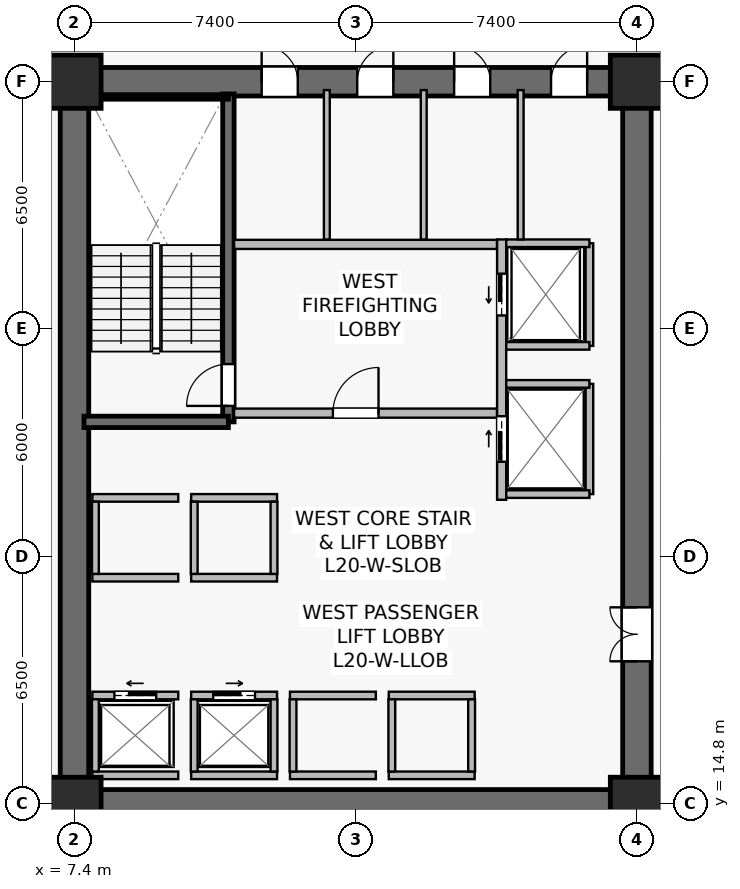
"""IFC4 building model, lengths in metres.
Left out: names, types, materials, properties, quantities, classifications, styles, units other than length and angle.
Written with IfcOpenShell. Run it as: python <this file> out.ifc"""

import sys

from ifc_helpers import new_model, si_unit, direction, frame, frame_2d, origin, origin_2d, place, context, subcontext, project, spatial, rectangle, extrude, source, transform, mapped, element, fill, save


model = new_model("IFC4")
c1 = context("Model", 3, precision=1e-05, world=origin(), true_north=direction((0.0, 1.0)))
c2 = subcontext(c1, "Body", "Model", "MODEL_VIEW")
j1 = project(units=[si_unit("LENGTHUNIT", "METRE"), si_unit("PLANEANGLEUNIT", "RADIAN")], contexts=[c1])
p1 = place(None, origin())
s1 = spatial("IfcSite", under=j1, at=p1, CompositionType="ELEMENT")
p2 = place(p1, origin())
s2 = spatial("IfcBuilding", under=s1, at=p2, CompositionType="ELEMENT")
p3 = place(p2, frame((0.0, 0.0, 82.6)))
s3 = spatial("IfcBuildingStorey", under=s2, at=p3, CompositionType="ELEMENT", Elevation=82.6)
p4 = place(p3, frame((7.025, 14.8, 0.0), z_axis=(0.0, 0.0, 1.0), x_axis=(1.0, 0.0, 0.0)))
e1 = element("IfcWall", 1, at=p4, inside=s3, PredefinedType="SHEAR", context=c2, shape_type="SweptSolid", body=[
    extrude(rectangle(XDim=15.55, YDim=0.75, at=frame_2d((7.775, 0.0))), origin(), (0.0, 0.0, 1.0), 3.78),
])
p5 = place(p3, frame((7.025, 33.8, 0.0), z_axis=(0.0, 0.0, 1.0), x_axis=(1.0, 0.0, 0.0)))
e2 = element("IfcWall", 2, at=p5, inside=s3, PredefinedType="SHEAR", context=c2, shape_type="SweptSolid", body=[
    extrude(rectangle(XDim=15.55, YDim=0.75, at=frame_2d((7.775, 0.0))), origin(), (0.0, 0.0, 1.0), 3.78),
])
p6 = place(p5, frame((5.3, 0.0, 0.0)))
e3 = element("IfcOpeningElement", 3, at=p6, cuts=e2, PredefinedType="OPENING", context=c2, shape_type="SweptSolid", body=[
    extrude(rectangle(XDim=0.95, YDim=2.15, at=frame_2d((0.475, 1.075))), frame((0.0, 0.385, 0.0), z_axis=(0.0, -1.0, 0.0), x_axis=(1.0, 0.0, 0.0)), (0.0, 0.0, 1.0), 0.77),
])
p7 = place(p5, frame((7.815, 0.0, 0.0)))
e4 = element("IfcOpeningElement", 4, at=p7, cuts=e2, PredefinedType="OPENING", context=c2, shape_type="SweptSolid", body=[
    extrude(rectangle(XDim=0.95, YDim=2.15, at=frame_2d((0.475, 1.075))), frame((0.0, 0.385, 0.0), z_axis=(0.0, -1.0, 0.0), x_axis=(1.0, 0.0, 0.0)), (0.0, 0.0, 1.0), 0.77),
])
p8 = place(p5, frame((10.365, 0.0, 0.0)))
e5 = element("IfcOpeningElement", 5, at=p8, cuts=e2, PredefinedType="OPENING", context=c2, shape_type="SweptSolid", body=[
    extrude(rectangle(XDim=0.95, YDim=2.15, at=frame_2d((0.475, 1.075))), frame((0.0, 0.385, 0.0), z_axis=(0.0, -1.0, 0.0), x_axis=(1.0, 0.0, 0.0)), (0.0, 0.0, 1.0), 0.77),
])
p9 = place(p5, frame((12.915, 0.0, 0.0)))
e6 = element("IfcOpeningElement", 6, at=p9, cuts=e2, PredefinedType="OPENING", context=c2, shape_type="SweptSolid", body=[
    extrude(rectangle(XDim=0.95, YDim=2.15, at=frame_2d((0.475, 1.075))), frame((0.0, 0.385, 0.0), z_axis=(0.0, -1.0, 0.0), x_axis=(1.0, 0.0, 0.0)), (0.0, 0.0, 1.0), 0.77),
])
p10 = place(p3, frame((7.4, 15.175, 0.0), z_axis=(0.0, 0.0, 1.0), x_axis=(0.0, 1.0, 0.0)))
e7 = element("IfcWall", 7, at=p10, inside=s3, PredefinedType="SHEAR", context=c2, shape_type="SweptSolid", body=[
    extrude(rectangle(XDim=18.25, YDim=0.75, at=frame_2d((9.125, 0.0))), origin(), (0.0, 0.0, 1.0), 3.78),
])
p11 = place(p3, frame((22.2, 15.175, 0.0), z_axis=(0.0, 0.0, 1.0), x_axis=(0.0, 1.0, 0.0)))
e8 = element("IfcWall", 8, at=p11, inside=s3, PredefinedType="SHEAR", context=c2, shape_type="SweptSolid", body=[
    extrude(rectangle(XDim=18.25, YDim=0.75, at=frame_2d((9.125, 0.0))), origin(), (0.0, 0.0, 1.0), 3.78),
])
p12 = place(p11, frame((3.375, 0.0, 0.0)))
e9 = element("IfcOpeningElement", 9, at=p12, cuts=e8, PredefinedType="OPENING", context=c2, shape_type="SweptSolid", body=[
    extrude(rectangle(XDim=1.42, YDim=2.2, at=frame_2d((0.71, 1.1))), frame((0.0, 0.385, 0.0), z_axis=(0.0, -1.0, 0.0), x_axis=(1.0, 0.0, 0.0)), (0.0, 0.0, 1.0), 0.77),
])
p13 = place(p3, frame((11.45, 24.85, 0.0), z_axis=(0.0, 0.0, 1.0), x_axis=(0.0, 1.0, 0.0)))
e10 = element("IfcWall", 10, at=p13, inside=s3, PredefinedType="SHEAR", context=c2, shape_type="SweptSolid", body=[
    extrude(rectangle(XDim=8.63, YDim=0.3, at=frame_2d((4.315, 0.0))), origin(), (0.0, 0.0, 1.0), 3.78),
])
p14 = place(p13, frame((0.42, 0.0, 0.0)))
e11 = element("IfcOpeningElement", 11, at=p14, cuts=e10, PredefinedType="OPENING", context=c2, shape_type="SweptSolid", body=[
    extrude(rectangle(XDim=1.1, YDim=2.15, at=frame_2d((0.55, 1.075))), frame((0.0, 0.16, 0.0), z_axis=(0.0, -1.0, 0.0), x_axis=(1.0, 0.0, 0.0)), (0.0, 0.0, 1.0), 0.32),
])
p15 = place(p3, frame((7.65, 24.85, 0.0), z_axis=(0.0, 0.0, 1.0), x_axis=(1.0, 0.0, 0.0)))
e12 = element("IfcWall", 12, at=p15, inside=s3, PredefinedType="SHEAR", context=c2, shape_type="SweptSolid", body=[
    extrude(rectangle(XDim=3.8, YDim=0.3, at=frame_2d((1.9, 0.0))), origin(), (0.0, 0.0, 1.0), 3.78),
])
p16 = place(p3, frame((7.73, 33.4, 0.0), z_axis=(0.0, 0.0, 1.0), x_axis=(1.0, 0.0, 0.0)))
e13 = element("IfcWall", 13, at=p16, inside=s3, PredefinedType="SOLIDWALL", context=c2, shape_type="SweptSolid", body=[
    extrude(rectangle(XDim=3.72, YDim=0.12, at=frame_2d((1.86, 0.0))), origin(), (0.0, 0.0, 1.0), 3.78),
])
m1 = source(origin(), c2, "Body", "SweptSolid", [
    extrude(rectangle(XDim=1.4, YDim=1.4, at=origin_2d()), origin(), (0.0, 0.0, 1.0), 4.1),
])
for number, where, z_axis, x_axis in (
    (14, (7.4, 14.8, 0.0), (0.0, 0.0, 1.0), (1.0, 0.0, 0.0)),
    (15, (22.2, 14.8, 0.0), (0.0, 0.0, 1.0), (1.0, 0.0, 0.0)),
    (16, (7.4, 33.8, 0.0), (0.0, 0.0, 1.0), (1.0, 0.0, 0.0)),
    (17, (22.2, 33.8, 0.0), (0.0, 0.0, 1.0), (1.0, 0.0, 0.0)),
):
    element("IfcColumn", number, at=place(p3, frame(where, z_axis=z_axis, x_axis=x_axis)), inside=s3, PredefinedType="COLUMN", context=c2, shape_type="MappedRepresentation", body=[
        mapped(m1, transform((0.0, 0.0, 0.0), scale=1.0)),
    ])
p17 = place(p3, frame((11.6, 25.08, 0.0), z_axis=(0.0, 0.0, 1.0), x_axis=(1.0, 0.0, 0.0)))
e18 = element("IfcWall", 18, at=p17, inside=s3, PredefinedType="SOLIDWALL", context=c2, shape_type="SweptSolid", body=[
    extrude(rectangle(XDim=6.92, YDim=0.24, at=frame_2d((3.46, 0.0))), origin(), (0.0, 0.0, 1.0), 3.115),
])
p18 = place(p17, frame((2.6, 0.0, 0.0)))
e19 = element("IfcOpeningElement", 19, at=p18, cuts=e18, PredefinedType="OPENING", context=c2, shape_type="SweptSolid", body=[
    extrude(rectangle(XDim=1.2, YDim=2.16, at=frame_2d((0.6, 1.08))), frame((0.0, 0.13, 0.0), z_axis=(0.0, -1.0, 0.0), x_axis=(1.0, 0.0, 0.0)), (0.0, 0.0, 1.0), 0.26),
])
p19 = place(p3, frame((11.6, 29.52, 0.0), z_axis=(0.0, 0.0, 1.0), x_axis=(1.0, 0.0, 0.0)))
e20 = element("IfcWall", 20, at=p19, inside=s3, PredefinedType="SOLIDWALL", context=c2, shape_type="SweptSolid", body=[
    extrude(rectangle(XDim=6.92, YDim=0.24, at=frame_2d((3.46, 0.0))), origin(), (0.0, 0.0, 1.0), 3.115),
])
p20 = place(p3, frame((18.64, 22.8, 0.0), z_axis=(0.0, 0.0, 1.0), x_axis=(0.0, 1.0, 0.0)))
e21 = element("IfcWall", 21, at=p20, inside=s3, PredefinedType="SOLIDWALL", context=c2, shape_type="SweptSolid", body=[
    extrude(rectangle(XDim=6.85, YDim=0.24, at=frame_2d((3.425, 0.0))), origin(), (0.0, 0.0, 1.0), 2.865),
])
p21 = place(p20, frame((4.85, 0.0, 0.0)))
e22 = element("IfcOpeningElement", 22, at=p21, cuts=e21, PredefinedType="OPENING", context=c2, shape_type="SweptSolid", body=[
    extrude(rectangle(XDim=1.1, YDim=2.22, at=frame_2d((0.55, 1.11))), frame((0.0, 0.13, 0.0), z_axis=(0.0, -1.0, 0.0), x_axis=(1.0, 0.0, 0.0)), (0.0, 0.0, 1.0), 0.26),
])
p22 = place(p20, frame((1.0, 0.0, 0.0)))
e23 = element("IfcOpeningElement", 23, at=p22, cuts=e21, PredefinedType="OPENING", context=c2, shape_type="SweptSolid", body=[
    extrude(rectangle(XDim=1.2, YDim=2.22, at=frame_2d((0.6, 1.11))), frame((0.0, 0.13, 0.0), z_axis=(0.0, -1.0, 0.0), x_axis=(1.0, 0.0, 0.0)), (0.0, 0.0, 1.0), 0.26),
])
p23 = place(p3, frame((7.87, 17.65, 0.0), z_axis=(0.0, 0.0, 1.0), x_axis=(1.0, 0.0, 0.0)))
e24 = element("IfcWall", 24, at=p23, inside=s3, PredefinedType="SOLIDWALL", context=c2, shape_type="SweptSolid", body=[
    extrude(rectangle(XDim=2.26, YDim=0.2, at=frame_2d((1.13, 0.0))), origin(), (0.0, 0.0, 1.0), 3.78),
])
p24 = place(p23, frame((0.58, 0.0, 0.0)))
e25 = element("IfcOpeningElement", 25, at=p24, cuts=e24, PredefinedType="OPENING", context=c2, shape_type="SweptSolid", body=[
    extrude(rectangle(XDim=1.1, YDim=2.22, at=frame_2d((0.55, 1.11))), frame((0.0, 0.11, 0.0), z_axis=(0.0, -1.0, 0.0), x_axis=(1.0, 0.0, 0.0)), (0.0, 0.0, 1.0), 0.22),
])
p25 = place(p3, frame((7.87, 15.55, 0.0), z_axis=(0.0, 0.0, 1.0), x_axis=(1.0, 0.0, 0.0)))
e26 = element("IfcWall", 26, at=p25, inside=s3, PredefinedType="SOLIDWALL", context=c2, shape_type="SweptSolid", body=[
    extrude(rectangle(XDim=2.26, YDim=0.2, at=frame_2d((1.13, 0.0))), origin(), (0.0, 0.0, 1.0), 3.78),
])
p26 = place(p3, frame((7.95, 15.65, 0.0), z_axis=(0.0, 0.0, 1.0), x_axis=(0.0, 1.0, 0.0)))
e27 = element("IfcWall", 27, at=p26, inside=s3, PredefinedType="SOLIDWALL", context=c2, shape_type="SweptSolid", body=[
    extrude(rectangle(XDim=1.9, YDim=0.18, at=frame_2d((0.95, 0.0))), origin(), (0.0, 0.0, 1.0), 3.78),
])
p27 = place(p3, frame((10.47, 17.65, 0.0), z_axis=(0.0, 0.0, 1.0), x_axis=(1.0, 0.0, 0.0)))
e28 = element("IfcWall", 28, at=p27, inside=s3, PredefinedType="SOLIDWALL", context=c2, shape_type="SweptSolid", body=[
    extrude(rectangle(XDim=2.26, YDim=0.2, at=frame_2d((1.13, 0.0))), origin(), (0.0, 0.0, 1.0), 3.78),
])
p28 = place(p27, frame((0.58, 0.0, 0.0)))
e29 = element("IfcOpeningElement", 29, at=p28, cuts=e28, PredefinedType="OPENING", context=c2, shape_type="SweptSolid", body=[
    extrude(rectangle(XDim=1.1, YDim=2.22, at=frame_2d((0.55, 1.11))), frame((0.0, 0.11, 0.0), z_axis=(0.0, -1.0, 0.0), x_axis=(1.0, 0.0, 0.0)), (0.0, 0.0, 1.0), 0.22),
])
p29 = place(p3, frame((10.47, 15.55, 0.0), z_axis=(0.0, 0.0, 1.0), x_axis=(1.0, 0.0, 0.0)))
e30 = element("IfcWall", 30, at=p29, inside=s3, PredefinedType="SOLIDWALL", context=c2, shape_type="SweptSolid", body=[
    extrude(rectangle(XDim=2.26, YDim=0.2, at=frame_2d((1.13, 0.0))), origin(), (0.0, 0.0, 1.0), 3.78),
])
for number, where, z_axis, x_axis in (
    (31, (10.55, 15.65, 0.0), (0.0, 0.0, 1.0), (0.0, 1.0, 0.0)),
    (32, (12.65, 15.65, 0.0), (0.0, 0.0, 1.0), (0.0, 1.0, 0.0)),
):
    element("IfcWall", number, at=place(p3, frame(where, z_axis=z_axis, x_axis=x_axis)), inside=s3, PredefinedType="SOLIDWALL", context=c2, shape_type="SweptSolid", body=[
        extrude(rectangle(XDim=1.9, YDim=0.18, at=frame_2d((0.95, 0.0))), origin(), (0.0, 0.0, 1.0), 3.78),
    ])
for number, where, z_axis, x_axis in (
    (33, (13.07, 17.65, 0.0), (0.0, 0.0, 1.0), (1.0, 0.0, 0.0)),
    (34, (13.07, 15.55, 0.0), (0.0, 0.0, 1.0), (1.0, 0.0, 0.0)),
):
    element("IfcWall", number, at=place(p3, frame(where, z_axis=z_axis, x_axis=x_axis)), inside=s3, PredefinedType="SOLIDWALL", context=c2, shape_type="SweptSolid", body=[
        extrude(rectangle(XDim=2.26, YDim=0.2, at=frame_2d((1.13, 0.0))), origin(), (0.0, 0.0, 1.0), 3.115),
    ])
p30 = place(p3, frame((13.15, 15.65, 0.0), z_axis=(0.0, 0.0, 1.0), x_axis=(0.0, 1.0, 0.0)))
e35 = element("IfcWall", 35, at=p30, inside=s3, PredefinedType="SOLIDWALL", context=c2, shape_type="SweptSolid", body=[
    extrude(rectangle(XDim=1.9, YDim=0.18, at=frame_2d((0.95, 0.0))), origin(), (0.0, 0.0, 1.0), 3.78),
])
for number, where, z_axis, x_axis in (
    (36, (15.67, 17.65, 0.0), (0.0, 0.0, 1.0), (1.0, 0.0, 0.0)),
    (37, (15.67, 15.55, 0.0), (0.0, 0.0, 1.0), (1.0, 0.0, 0.0)),
):
    element("IfcWall", number, at=place(p3, frame(where, z_axis=z_axis, x_axis=x_axis)), inside=s3, PredefinedType="SOLIDWALL", context=c2, shape_type="SweptSolid", body=[
        extrude(rectangle(XDim=2.26, YDim=0.2, at=frame_2d((1.13, 0.0))), origin(), (0.0, 0.0, 1.0), 3.78),
    ])
for number, where, z_axis, x_axis in (
    (38, (15.75, 15.65, 0.0), (0.0, 0.0, 1.0), (0.0, 1.0, 0.0)),
    (39, (17.85, 15.65, 0.0), (0.0, 0.0, 1.0), (0.0, 1.0, 0.0)),
):
    element("IfcWall", number, at=place(p3, frame(where, z_axis=z_axis, x_axis=x_axis)), inside=s3, PredefinedType="SOLIDWALL", context=c2, shape_type="SweptSolid", body=[
        extrude(rectangle(XDim=1.9, YDim=0.18, at=frame_2d((0.95, 0.0))), origin(), (0.0, 0.0, 1.0), 3.78),
    ])
for number, where, z_axis, x_axis in (
    (40, (7.87, 20.75, 0.0), (0.0, 0.0, 1.0), (1.0, 0.0, 0.0)),
    (41, (7.87, 22.85, 0.0), (0.0, 0.0, 1.0), (1.0, 0.0, 0.0)),
):
    element("IfcWall", number, at=place(p3, frame(where, z_axis=z_axis, x_axis=x_axis)), inside=s3, PredefinedType="SOLIDWALL", context=c2, shape_type="SweptSolid", body=[
        extrude(rectangle(XDim=2.26, YDim=0.2, at=frame_2d((1.13, 0.0))), origin(), (0.0, 0.0, 1.0), 3.78),
    ])
p31 = place(p3, frame((7.95, 20.85, 0.0), z_axis=(0.0, 0.0, 1.0), x_axis=(0.0, 1.0, 0.0)))
e42 = element("IfcWall", 42, at=p31, inside=s3, PredefinedType="SOLIDWALL", context=c2, shape_type="SweptSolid", body=[
    extrude(rectangle(XDim=1.9, YDim=0.18, at=frame_2d((0.95, 0.0))), origin(), (0.0, 0.0, 1.0), 3.78),
])
for number, where, z_axis, x_axis in (
    (43, (10.47, 20.75, 0.0), (0.0, 0.0, 1.0), (1.0, 0.0, 0.0)),
    (44, (10.47, 22.85, 0.0), (0.0, 0.0, 1.0), (1.0, 0.0, 0.0)),
):
    element("IfcWall", number, at=place(p3, frame(where, z_axis=z_axis, x_axis=x_axis)), inside=s3, PredefinedType="SOLIDWALL", context=c2, shape_type="SweptSolid", body=[
        extrude(rectangle(XDim=2.26, YDim=0.2, at=frame_2d((1.13, 0.0))), origin(), (0.0, 0.0, 1.0), 3.78),
    ])
for number, where, z_axis, x_axis in (
    (45, (10.55, 20.85, 0.0), (0.0, 0.0, 1.0), (0.0, 1.0, 0.0)),
    (46, (12.65, 20.85, 0.0), (0.0, 0.0, 1.0), (0.0, 1.0, 0.0)),
):
    element("IfcWall", number, at=place(p3, frame(where, z_axis=z_axis, x_axis=x_axis)), inside=s3, PredefinedType="SOLIDWALL", context=c2, shape_type="SweptSolid", body=[
        extrude(rectangle(XDim=1.9, YDim=0.18, at=frame_2d((0.95, 0.0))), origin(), (0.0, 0.0, 1.0), 3.78),
    ])
p32 = place(p3, frame((20.95, 26.85, 0.0), z_axis=(0.0, 0.0, 1.0), x_axis=(0.0, 1.0, 0.0)))
e47 = element("IfcWall", 47, at=p32, inside=s3, PredefinedType="SOLIDWALL", context=c2, shape_type="SweptSolid", body=[
    extrude(rectangle(XDim=2.7, YDim=0.2, at=frame_2d((1.35, 0.0))), origin(), (0.0, 0.0, 1.0), 3.78),
])
p33 = place(p3, frame((18.76, 29.55, 0.0), z_axis=(0.0, 0.0, 1.0), x_axis=(1.0, 0.0, 0.0)))
e48 = element("IfcWall", 48, at=p33, inside=s3, PredefinedType="SOLIDWALL", context=c2, shape_type="SweptSolid", body=[
    extrude(rectangle(XDim=2.19, YDim=0.2, at=frame_2d((1.095, 0.0))), origin(), (0.0, 0.0, 1.0), 3.78),
])
p34 = place(p3, frame((18.76, 26.85, 0.0), z_axis=(0.0, 0.0, 1.0), x_axis=(1.0, 0.0, 0.0)))
e49 = element("IfcWall", 49, at=p34, inside=s3, PredefinedType="SOLIDWALL", context=c2, shape_type="SweptSolid", body=[
    extrude(rectangle(XDim=2.19, YDim=0.2, at=frame_2d((1.095, 0.0))), origin(), (0.0, 0.0, 1.0), 3.177),
])
p35 = place(p3, frame((20.95, 22.95, 0.0), z_axis=(0.0, 0.0, 1.0), x_axis=(0.0, 1.0, 0.0)))
e50 = element("IfcWall", 50, at=p35, inside=s3, PredefinedType="SOLIDWALL", context=c2, shape_type="SweptSolid", body=[
    extrude(rectangle(XDim=2.9, YDim=0.2, at=frame_2d((1.45, 0.0))), origin(), (0.0, 0.0, 1.0), 2.865),
])
for number, where, z_axis, x_axis in (
    (51, (18.76, 25.85, 0.0), (0.0, 0.0, 1.0), (1.0, 0.0, 0.0)),
    (52, (18.76, 22.95, 0.0), (0.0, 0.0, 1.0), (1.0, 0.0, 0.0)),
):
    element("IfcWall", number, at=place(p3, frame(where, z_axis=z_axis, x_axis=x_axis)), inside=s3, PredefinedType="SOLIDWALL", context=c2, shape_type="SweptSolid", body=[
        extrude(rectangle(XDim=2.19, YDim=0.2, at=frame_2d((1.095, 0.0))), origin(), (0.0, 0.0, 1.0), 3.78),
    ])
for number, where, z_axis, x_axis in (
    (53, (14.04, 29.65, 0.0), (0.0, 0.0, 1.0), (0.0, 1.0, 0.0)),
    (54, (16.59, 29.65, 0.0), (0.0, 0.0, 1.0), (0.0, 1.0, 0.0)),
    (55, (19.14, 29.65, 0.0), (0.0, 0.0, 1.0), (0.0, 1.0, 0.0)),
):
    element("IfcWall", number, at=place(p3, frame(where, z_axis=z_axis, x_axis=x_axis)), inside=s3, PredefinedType="PLUMBINGWALL", context=c2, shape_type="SweptSolid", body=[
        extrude(rectangle(XDim=3.93, YDim=0.155, at=frame_2d((1.965, 0.0))), origin(), (0.0, 0.0, 1.0), 3.78),
    ])
m2 = source(origin(), c2, "Body", "SweptSolid", [
    extrude(rectangle(XDim=1.1, YDim=2.15, at=frame_2d((0.55, 1.075))), frame((0.0, 0.025, 0.0), z_axis=(0.0, -1.0, 0.0), x_axis=(1.0, 0.0, 0.0)), (0.0, 0.0, 1.0), 0.05),
])
p36 = place(p14, origin())
e56 = element("IfcDoor", 56, at=p36, inside=s3, OperationType="SINGLE_SWING_LEFT", PredefinedType="DOOR", context=c2, shape_type="MappedRepresentation", body=[
    mapped(m2, transform((0.0, 0.0, 0.0), scale=1.0)),
])
fill(e11, e56)
m3 = source(origin(), c2, "Body", "SweptSolid", [
    extrude(rectangle(XDim=1.2, YDim=2.16, at=frame_2d((0.6, 1.08))), frame((0.0, 0.025, 0.0), z_axis=(0.0, -1.0, 0.0), x_axis=(1.0, 0.0, 0.0)), (0.0, 0.0, 1.0), 0.05),
])
p37 = place(p18, origin())
e57 = element("IfcDoor", 57, at=p37, inside=s3, OperationType="SINGLE_SWING_RIGHT", PredefinedType="DOOR", context=c2, shape_type="MappedRepresentation", body=[
    mapped(m3, transform((0.0, 0.0, 0.0), scale=1.0)),
])
fill(e19, e57)
m4 = source(origin(), c2, "Body", "SweptSolid", [
    extrude(rectangle(XDim=1.1, YDim=2.22, at=frame_2d((0.55, 1.11))), frame((0.0, 0.025, 0.0), z_axis=(0.0, -1.0, 0.0), x_axis=(1.0, 0.0, 0.0)), (0.0, 0.0, 1.0), 0.05),
])
p38 = place(p24, origin())
e58 = element("IfcDoor", 58, at=p38, inside=s3, OperationType="SLIDING_TO_LEFT", PredefinedType="USERDEFINED", context=c2, shape_type="MappedRepresentation", body=[
    mapped(m4, transform((0.0, 0.0, 0.0), scale=1.0)),
])
fill(e25, e58)
p39 = place(p28, origin())
e59 = element("IfcDoor", 59, at=p39, inside=s3, OperationType="SLIDING_TO_RIGHT", PredefinedType="USERDEFINED", context=c2, shape_type="MappedRepresentation", body=[
    mapped(m4, transform((0.0, 0.0, 0.0), scale=1.0)),
])
fill(e29, e59)
p40 = place(p21, origin())
e60 = element("IfcDoor", 60, at=p40, inside=s3, OperationType="SLIDING_TO_LEFT", PredefinedType="USERDEFINED", context=c2, shape_type="MappedRepresentation", body=[
    mapped(m4, transform((0.0, 0.0, 0.0), scale=1.0)),
])
fill(e22, e60)
m5 = source(origin(), c2, "Body", "SweptSolid", [
    extrude(rectangle(XDim=1.2, YDim=2.22, at=frame_2d((0.6, 1.11))), frame((0.0, 0.025, 0.0), z_axis=(0.0, -1.0, 0.0), x_axis=(1.0, 0.0, 0.0)), (0.0, 0.0, 1.0), 0.05),
])
p41 = place(p22, origin())
e61 = element("IfcDoor", 61, at=p41, inside=s3, OperationType="SLIDING_TO_RIGHT", PredefinedType="USERDEFINED", context=c2, shape_type="MappedRepresentation", body=[
    mapped(m5, transform((0.0, 0.0, 0.0), scale=1.0)),
])
fill(e23, e61)
m6 = source(origin(), c2, "Body", "SweptSolid", [
    extrude(rectangle(XDim=1.42, YDim=2.2, at=frame_2d((0.71, 1.1))), frame((0.0, 0.025, 0.0), z_axis=(0.0, -1.0, 0.0), x_axis=(1.0, 0.0, 0.0)), (0.0, 0.0, 1.0), 0.05),
])
p42 = place(p12, origin())
e62 = element("IfcDoor", 62, at=p42, inside=s3, OperationType="DOUBLE_DOOR_SINGLE_SWING", PredefinedType="DOOR", context=c2, shape_type="MappedRepresentation", body=[
    mapped(m6, transform((0.0, 0.0, 0.0), scale=1.0)),
])
fill(e9, e62)
m7 = source(origin(), c2, "Body", "SweptSolid", [
    extrude(rectangle(XDim=0.95, YDim=2.15, at=frame_2d((0.475, 1.075))), frame((0.0, 0.025, 0.0), z_axis=(0.0, -1.0, 0.0), x_axis=(1.0, 0.0, 0.0)), (0.0, 0.0, 1.0), 0.05),
])
p43 = place(p6, origin())
e63 = element("IfcDoor", 63, at=p43, inside=s3, OperationType="SINGLE_SWING_LEFT", PredefinedType="DOOR", context=c2, shape_type="MappedRepresentation", body=[
    mapped(m7, transform((0.0, 0.0, 0.0), scale=1.0)),
])
fill(e3, e63)
p44 = place(p7, origin())
e64 = element("IfcDoor", 64, at=p44, inside=s3, OperationType="SINGLE_SWING_RIGHT", PredefinedType="DOOR", context=c2, shape_type="MappedRepresentation", body=[
    mapped(m7, transform((0.0, 0.0, 0.0), scale=1.0)),
])
fill(e4, e64)
p45 = place(p8, origin())
e65 = element("IfcDoor", 65, at=p45, inside=s3, OperationType="SINGLE_SWING_LEFT", PredefinedType="DOOR", context=c2, shape_type="MappedRepresentation", body=[
    mapped(m7, transform((0.0, 0.0, 0.0), scale=1.0)),
])
fill(e5, e65)
p46 = place(p9, origin())
e66 = element("IfcDoor", 66, at=p46, inside=s3, OperationType="SINGLE_SWING_RIGHT", PredefinedType="DOOR", context=c2, shape_type="MappedRepresentation", body=[
    mapped(m7, transform((0.0, 0.0, 0.0), scale=1.0)),
])
fill(e6, e66)
save(model, sys.argv[1])
